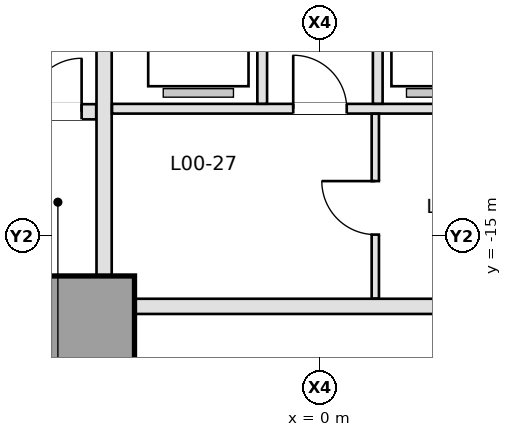
"""IFC4 building model, lengths in metres.
Left out: names, types, materials, properties, quantities, classifications, styles, units other than length and angle.
Written with IfcOpenShell. Run it as: python <this file> out.ifc"""

import sys

from ifc_helpers import new_model, si_unit, direction, frame, frame_2d, origin, origin_2d, place, context, subcontext, project, spatial, rectangle, extrude, element, fill, save


model = new_model("IFC4")
c1 = context("Model", 3, precision=1e-05, world=origin(), true_north=direction((0.0, 1.0)))
c2 = subcontext(c1, "Body", "Model", "MODEL_VIEW")
j1 = project(units=[si_unit("LENGTHUNIT", "METRE"), si_unit("PLANEANGLEUNIT", "RADIAN")], contexts=[c1])
p1 = place(None, origin())
s1 = spatial("IfcSite", under=j1, at=p1, CompositionType="ELEMENT")
p2 = place(p1, origin())
s2 = spatial("IfcBuilding", under=s1, at=p2, CompositionType="ELEMENT")
p3 = place(p2, origin())
s3 = spatial("IfcBuildingStorey", under=s2, at=p3, CompositionType="ELEMENT", Elevation=0.0)
p4 = place(p3, frame((-8.9, -16.15, 0.0), z_axis=(0.0, 0.0, 1.0), x_axis=(1.0, 0.0, 0.0)))
e1 = element("IfcWall", 1, at=p4, inside=s3, PredefinedType="SHEAR", context=c2, shape_type="SweptSolid", body=[
    extrude(rectangle(XDim=5.15, YDim=0.6, at=frame_2d((2.575, 0.0))), origin(), (0.0, 0.0, 1.0), 5.0),
])
p5 = place(p3, frame((-3.75, -16.35, 0.0), z_axis=(0.0, 0.0, 1.0), x_axis=(1.0, 0.0, 0.0)))
e2 = element("IfcColumn", 2, at=p5, inside=s3, PredefinedType="COLUMN", context=c2, shape_type="SweptSolid", body=[
    extrude(rectangle(XDim=1.4, YDim=1.4, at=origin_2d()), origin(), (0.0, 0.0, 1.0), 5.0),
])
p6 = place(p3, frame((-8.598, -12.95, 0.0), z_axis=(0.0, 0.0, 1.0), x_axis=(1.0, 0.0, 0.0)))
e3 = element("IfcWall", 3, at=p6, inside=s3, PredefinedType="PARTITIONING", context=c2, shape_type="SweptSolid", body=[
    extrude(rectangle(XDim=4.918, YDim=0.25, at=frame_2d((2.459, 0.0))), origin(), (0.0, 0.0, 1.0), 4.7),
])
p7 = place(p6, frame((0.498, 0.0, 0.0)))
e4 = element("IfcOpeningElement", 4, at=p7, cuts=e3, PredefinedType="OPENING", context=c2, shape_type="SweptSolid", body=[
    extrude(rectangle(XDim=1.1, YDim=2.15, at=frame_2d((0.55, 1.075))), frame((0.0, 0.135, 0.0), z_axis=(0.0, -1.0, 0.0), x_axis=(1.0, 0.0, 0.0)), (0.0, 0.0, 1.0), 0.27),
])
p8 = place(p6, frame((2.398, 0.0, 0.0)))
e5 = element("IfcOpeningElement", 5, at=p8, cuts=e3, PredefinedType="OPENING", context=c2, shape_type="SweptSolid", body=[
    extrude(rectangle(XDim=0.88, YDim=2.1, at=frame_2d((0.44, 1.05))), frame((0.0, 0.135, 0.0), z_axis=(0.0, -1.0, 0.0), x_axis=(1.0, 0.0, 0.0)), (0.0, 0.0, 1.0), 0.27),
])
p9 = place(p6, frame((3.798, 0.0, 0.0)))
e6 = element("IfcOpeningElement", 6, at=p9, cuts=e3, PredefinedType="OPENING", context=c2, shape_type="SweptSolid", body=[
    extrude(rectangle(XDim=0.88, YDim=2.1, at=frame_2d((0.44, 1.05))), frame((0.0, 0.135, 0.0), z_axis=(0.0, -1.0, 0.0), x_axis=(1.0, 0.0, 0.0)), (0.0, 0.0, 1.0), 0.27),
])
p10 = place(p3, frame((-3.55, -15.648, 0.0), z_axis=(0.0, 0.0, 1.0), x_axis=(0.0, 1.0, 0.0)))
e7 = element("IfcWall", 7, at=p10, inside=s3, PredefinedType="PARTITIONING", context=c2, shape_type="SweptSolid", body=[
    extrude(rectangle(XDim=10.146, YDim=0.25, at=frame_2d((5.073, 0.0))), origin(), (0.0, 0.0, 1.0), 4.7),
])
p11 = place(p10, frame((5.948, 0.0, 0.0)))
e8 = element("IfcOpeningElement", 8, at=p11, cuts=e7, PredefinedType="OPENING", context=c2, shape_type="SweptSolid", body=[
    extrude(rectangle(XDim=1.0, YDim=2.15, at=frame_2d((0.5, 1.075))), frame((0.0, 0.135, 0.0), z_axis=(0.0, -1.0, 0.0), x_axis=(1.0, 0.0, 0.0)), (0.0, 0.0, 1.0), 0.27),
])
p12 = place(p3, frame((-3.048, -16.15, 0.0), z_axis=(0.0, 0.0, 1.0), x_axis=(1.0, 0.0, 0.0)))
e9 = element("IfcWall", 9, at=p12, inside=s3, PredefinedType="PARTITIONING", context=c2, shape_type="SweptSolid", body=[
    extrude(rectangle(XDim=6.096, YDim=0.25, at=frame_2d((3.048, 0.0))), origin(), (0.0, 0.0, 1.0), 3.676),
])
p13 = place(p3, frame((-3.42, -12.9, 0.0), z_axis=(0.0, 0.0, 1.0), x_axis=(1.0, 0.0, 0.0)))
e10 = element("IfcWall", 10, at=p13, inside=s3, PredefinedType="PARTITIONING", context=c2, shape_type="SweptSolid", body=[
    extrude(rectangle(XDim=6.84, YDim=0.16, at=frame_2d((3.42, 0.0))), origin(), (0.0, 0.0, 1.0), 4.7),
])
p14 = place(p13, frame((2.98, 0.0, 0.0)))
e11 = element("IfcOpeningElement", 11, at=p14, cuts=e10, PredefinedType="OPENING", context=c2, shape_type="SweptSolid", body=[
    extrude(rectangle(XDim=0.88, YDim=2.12, at=frame_2d((0.44, 1.06))), frame((0.0, 0.09, 0.0), z_axis=(0.0, -1.0, 0.0), x_axis=(1.0, 0.0, 0.0)), (0.0, 0.0, 1.0), 0.18),
])
for number, where, z_axis, x_axis in (
    (12, (-0.95, -12.818, 0.0), (0.0, 0.0, 1.0), (0.0, 1.0, 0.0)),
    (13, (0.95, -12.818, 0.0), (0.0, 0.0, 1.0), (0.0, 1.0, 0.0)),
):
    element("IfcWall", number, at=place(p3, frame(where, z_axis=z_axis, x_axis=x_axis)), inside=s3, PredefinedType="PARTITIONING", context=c2, shape_type="SweptSolid", body=[
        extrude(rectangle(XDim=2.638, YDim=0.16, at=frame_2d((1.319, 0.0))), origin(), (0.0, 0.0, 1.0), 4.7),
    ])
p15 = place(p3, frame((0.91, -16.02, 0.0), z_axis=(0.0, 0.0, 1.0), x_axis=(0.0, 1.0, 0.0)))
e14 = element("IfcWall", 14, at=p15, inside=s3, PredefinedType="PARTITIONING", context=c2, shape_type="SweptSolid", body=[
    extrude(rectangle(XDim=3.038, YDim=0.12, at=frame_2d((1.519, 0.0))), origin(), (0.0, 0.0, 1.0), 4.7),
])
p16 = place(p15, frame((1.05, 0.0, 0.0)))
e15 = element("IfcOpeningElement", 15, at=p16, cuts=e14, PredefinedType="OPENING", context=c2, shape_type="SweptSolid", body=[
    extrude(rectangle(XDim=0.88, YDim=2.12, at=frame_2d((0.44, 1.06))), frame((0.0, 0.07, 0.0), z_axis=(0.0, -1.0, 0.0), x_axis=(1.0, 0.0, 0.0)), (0.0, 0.0, 1.0), 0.14),
])
p17 = place(p9, origin())
e16 = element("IfcDoor", 16, at=p17, inside=s3, OperationType="SINGLE_SWING_RIGHT", PredefinedType="TRAPDOOR", context=c2, shape_type="SweptSolid", body=[
    extrude(rectangle(XDim=0.88, YDim=2.1, at=frame_2d((0.44, 1.05))), frame((0.0, 0.025, 0.0), z_axis=(0.0, -1.0, 0.0), x_axis=(1.0, 0.0, 0.0)), (0.0, 0.0, 1.0), 0.05),
])
fill(e6, e16)
p18 = place(p14, origin())
e17 = element("IfcDoor", 17, at=p18, inside=s3, OperationType="SINGLE_SWING_LEFT", PredefinedType="DOOR", context=c2, shape_type="SweptSolid", body=[
    extrude(rectangle(XDim=0.88, YDim=2.12, at=frame_2d((0.44, 1.06))), frame((0.0, 0.025, 0.0), z_axis=(0.0, -1.0, 0.0), x_axis=(1.0, 0.0, 0.0)), (0.0, 0.0, 1.0), 0.05),
])
fill(e11, e17)
p19 = place(p16, origin())
e18 = element("IfcDoor", 18, at=p19, inside=s3, OperationType="SINGLE_SWING_RIGHT", PredefinedType="DOOR", context=c2, shape_type="SweptSolid", body=[
    extrude(rectangle(XDim=0.88, YDim=2.12, at=frame_2d((0.44, 1.06))), frame((0.0, 0.025, 0.0), z_axis=(0.0, -1.0, 0.0), x_axis=(1.0, 0.0, 0.0)), (0.0, 0.0, 1.0), 0.05),
])
fill(e15, e18)
save(model, sys.argv[1])
